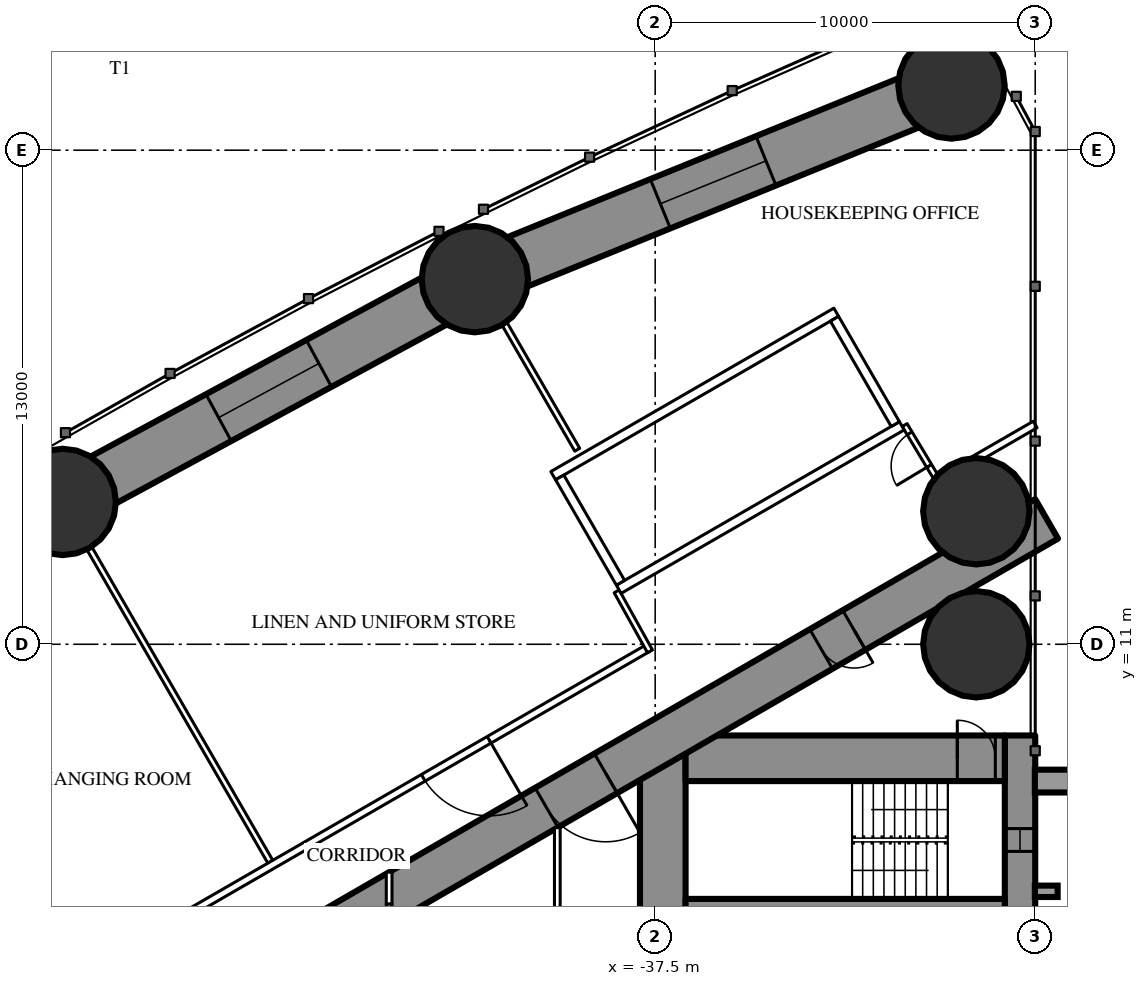
"""IFC4 building model, lengths in metres.
Left out: names, types, materials, properties, quantities, classifications, styles, units other than length and angle.
Written with IfcOpenShell. Run it as: python <this file> out.ifc"""

import sys

from ifc_helpers import new_model, si_unit, direction, frame, frame_2d, origin, origin_2d, place, context, subcontext, project, spatial, rectangle, hollow_circle, extrude, element, fill, save


model = new_model("IFC4")
c1 = context("Model", 3, precision=1e-05, world=origin(), true_north=direction((0.0, 1.0)))
c2 = subcontext(c1, "Body", "Model", "MODEL_VIEW")
j1 = project(units=[si_unit("LENGTHUNIT", "METRE"), si_unit("PLANEANGLEUNIT", "RADIAN")], contexts=[c1])
p1 = place(None, origin())
s1 = spatial("IfcSite", under=j1, at=p1, CompositionType="ELEMENT")
p2 = place(p1, origin())
s2 = spatial("IfcBuilding", under=s1, at=p2, CompositionType="ELEMENT")
p3 = place(p2, frame((0.0, 0.0, 77.5)))
s3 = spatial("IfcBuildingStorey", under=s2, at=p3, CompositionType="ELEMENT", Elevation=77.5)
for number, where, z_axis, x_axis in (
    (1, (-29.703, 25.703, 0.0), (0.0, 0.0, 1.0), (1.0, 0.0, 0.0)),
    (2, (-29.05, 11.0, 0.0), (0.0, 0.0, 1.0), (1.0, 0.0, 0.0)),
    (3, (-29.05, 14.5, 0.0), (0.0, 0.0, 1.0), (1.0, 0.0, 0.0)),
    (4, (-42.245, 20.607, 0.0), (0.0, 0.0, 1.0), (1.0, 0.0, 0.0)),
    (5, (-53.09, 14.745, 0.0), (0.0, 0.0, 1.0), (1.0, 0.0, 0.0)),
):
    element("IfcColumn", number, at=place(p3, frame(where, z_axis=z_axis, x_axis=x_axis)), inside=s3, PredefinedType="COLUMN", context=c2, shape_type="SweptSolid", body=[
        extrude(hollow_circle(Radius=1.4, WallThickness=0.12, at=origin_2d()), origin(), (0.0, 0.0, 1.0), 3.5),
    ])
p4 = place(p3, frame((-27.9, 8.6, 0.0), z_axis=(0.0, 0.0, 1.0), x_axis=(0.0, -1.0, 0.0)))
e6 = element("IfcWall", 6, at=p4, inside=s3, PredefinedType="SHEAR", context=c2, shape_type="SweptSolid", body=[
    extrude(rectangle(XDim=17.2, YDim=0.8, at=frame_2d((8.6, 0.0))), origin(), (0.0, 0.0, 1.0), 3.5),
])
p5 = place(p4, frame((2.45, 0.0, 0.6)))
e7 = element("IfcOpeningElement", 7, at=p5, cuts=e6, PredefinedType="OPENING", context=c2, shape_type="SweptSolid", body=[
    extrude(rectangle(XDim=0.6, YDim=2.1, at=frame_2d((0.3, 1.05))), frame((0.0, 0.41, 0.0), z_axis=(0.0, -1.0, 0.0), x_axis=(1.0, 0.0, 0.0)), (0.0, 0.0, 1.0), 0.82),
])
p6 = place(p4, frame((14.15, 0.0, 0.6)))
e8 = element("IfcOpeningElement", 8, at=p6, cuts=e6, PredefinedType="OPENING", context=c2, shape_type="SweptSolid", body=[
    extrude(rectangle(XDim=0.6, YDim=2.1, at=frame_2d((0.3, 1.05))), frame((0.0, 0.41, 0.0), z_axis=(0.0, -1.0, 0.0), x_axis=(1.0, 0.0, 0.0)), (0.0, 0.0, 1.0), 0.82),
])
p7 = place(p3, frame((-37.3, 8.6, 0.0), z_axis=(0.0, 0.0, 1.0), x_axis=(0.0, -1.0, 0.0)))
e9 = element("IfcWall", 9, at=p7, inside=s3, PredefinedType="SHEAR", context=c2, shape_type="SweptSolid", body=[
    extrude(rectangle(XDim=17.2, YDim=1.2, at=frame_2d((8.6, 0.0))), origin(), (0.0, 0.0, 1.0), 3.5),
])
p8 = place(p7, frame((7.7, 0.0, 0.0)))
e10 = element("IfcOpeningElement", 10, at=p8, cuts=e9, PredefinedType="OPENING", context=c2, shape_type="SweptSolid", body=[
    extrude(rectangle(XDim=1.8, YDim=2.2, at=frame_2d((0.9, 1.1))), frame((0.0, 0.61, 0.0), z_axis=(0.0, -1.0, 0.0), x_axis=(1.0, 0.0, 0.0)), (0.0, 0.0, 1.0), 1.22),
])
p9 = place(p3, frame((-28.3, 8.0, 0.0), z_axis=(0.0, 0.0, 1.0), x_axis=(-1.0, 0.0, 0.0)))
e11 = element("IfcWall", 11, at=p9, inside=s3, PredefinedType="SHEAR", context=c2, shape_type="SweptSolid", body=[
    extrude(rectangle(XDim=8.4, YDim=1.2, at=frame_2d((4.2, 0.0))), origin(), (0.0, 0.0, 1.0), 3.5),
])
p10 = place(p9, frame((0.25, 0.0, 0.0)))
e12 = element("IfcOpeningElement", 12, at=p10, cuts=e11, PredefinedType="OPENING", context=c2, shape_type="SweptSolid", body=[
    extrude(rectangle(XDim=1.0, YDim=2.2, at=frame_2d((0.5, 1.1))), frame((0.0, 0.61, 0.0), z_axis=(0.0, -1.0, 0.0), x_axis=(1.0, 0.0, 0.0)), (0.0, 0.0, 1.0), 1.22),
])
p11 = place(p3, frame((-28.3, 4.15, 0.0), z_axis=(0.0, 0.0, 1.0), x_axis=(-1.0, 0.0, 0.0)))
e13 = element("IfcWall", 13, at=p11, inside=s3, PredefinedType="SHEAR", context=c2, shape_type="SweptSolid", body=[
    extrude(rectangle(XDim=8.4, YDim=0.3, at=frame_2d((4.2, 0.0))), origin(), (0.0, 0.0, 1.0), 3.5),
])
p12 = place(p3, frame((-27.2, 14.3, 0.0), z_axis=(0.0, 0.0, 1.0), x_axis=(-0.866026593062, -0.499997940104, 0.0)))
e14 = element("IfcWall", 14, at=p12, inside=s3, PredefinedType="SHEAR", context=c2, shape_type="SweptSolid", body=[
    extrude(rectangle(XDim=28.946, YDim=1.2, at=frame_2d((14.473, 0.0))), origin(), (0.0, 0.0, 1.0), 3.5),
])
p13 = place(p12, frame((5.85, 0.0, 0.0)))
e15 = element("IfcOpeningElement", 15, at=p13, cuts=e14, PredefinedType="OPENING", context=c2, shape_type="SweptSolid", body=[
    extrude(rectangle(XDim=1.0, YDim=2.2, at=frame_2d((0.5, 1.1))), frame((0.0, 0.61, 0.0), z_axis=(0.0, -1.0, 0.0), x_axis=(1.0, 0.0, 0.0)), (0.0, 0.0, 1.0), 1.22),
])
p14 = place(p12, frame((13.395, 0.0, 0.0)))
e16 = element("IfcOpeningElement", 16, at=p14, cuts=e14, PredefinedType="OPENING", context=c2, shape_type="SweptSolid", body=[
    extrude(rectangle(XDim=1.8, YDim=2.04, at=frame_2d((0.9, 1.02))), frame((0.0, 0.61, 0.0), z_axis=(0.0, -1.0, 0.0), x_axis=(1.0, 0.0, 0.0)), (0.0, 0.0, 1.0), 1.22),
])
p15 = place(p3, frame((-29.703, 25.703, 0.0), z_axis=(0.0, 0.0, 1.0), x_axis=(-0.926463236197, -0.376385270667, 0.0)))
e17 = element("IfcWall", 17, at=p15, inside=s3, PredefinedType="SHEAR", context=c2, shape_type="SweptSolid", body=[
    extrude(rectangle(XDim=13.537, YDim=1.4, at=frame_2d((6.769, 0.0))), origin(), (0.0, 0.0, 1.0), 3.5),
])
p16 = place(p15, frame((5.269, 0.0, 0.6)))
e18 = element("IfcOpeningElement", 18, at=p16, cuts=e17, PredefinedType="OPENING", context=c2, shape_type="SweptSolid", body=[
    extrude(rectangle(XDim=3.0, YDim=1.2, at=frame_2d((1.5, 0.6))), frame((0.0, 0.71, 0.0), z_axis=(0.0, -1.0, 0.0), x_axis=(1.0, 0.0, 0.0)), (0.0, 0.0, 1.0), 1.42),
])
p17 = place(p3, frame((-42.245, 20.607, 0.0), z_axis=(0.0, 0.0, 1.0), x_axis=(-0.879692855603, -0.475542300749, 0.0)))
e19 = element("IfcWall", 19, at=p17, inside=s3, PredefinedType="SHEAR", context=c2, shape_type="SweptSolid", body=[
    extrude(rectangle(XDim=12.328, YDim=1.4, at=frame_2d((6.164, 0.0))), origin(), (0.0, 0.0, 1.0), 3.5),
])
p18 = place(p17, frame((4.664, 0.0, 0.6)))
e20 = element("IfcOpeningElement", 20, at=p18, cuts=e19, PredefinedType="OPENING", context=c2, shape_type="SweptSolid", body=[
    extrude(rectangle(XDim=3.0, YDim=1.2, at=frame_2d((1.5, 0.6))), frame((0.0, 0.71, 0.0), z_axis=(0.0, -1.0, 0.0), x_axis=(1.0, 0.0, 0.0)), (0.0, 0.0, 1.0), 1.42),
])
p19 = place(p3, frame((-53.09, 14.745, 0.0), z_axis=(0.0, 0.0, 1.0), x_axis=(-0.850225894333, -0.526418016984, 0.0)))
e21 = element("IfcWall", 21, at=p19, inside=s3, PredefinedType="SHEAR", context=c2, shape_type="SweptSolid", body=[
    extrude(rectangle(XDim=12.328, YDim=1.4, at=frame_2d((6.164, 0.0))), origin(), (0.0, 0.0, 1.0), 3.5),
])
p20 = place(p19, frame((4.664, 0.0, 0.6)))
e22 = element("IfcOpeningElement", 22, at=p20, cuts=e21, PredefinedType="OPENING", context=c2, shape_type="SweptSolid", body=[
    extrude(rectangle(XDim=3.0, YDim=1.2, at=frame_2d((1.5, 0.6))), frame((0.0, 0.71, 0.0), z_axis=(0.0, -1.0, 0.0), x_axis=(1.0, 0.0, 0.0)), (0.0, 0.0, 1.0), 1.42),
])
p21 = place(p3, frame((-47.627, 5.278, 0.0), z_axis=(0.0, 0.0, 1.0), x_axis=(-0.500009844318, 0.86601972009, 0.0)))
e23 = element("IfcWall", 23, at=p21, inside=s3, PredefinedType="PARTITIONING", context=c2, shape_type="SweptSolid", body=[
    extrude(rectangle(XDim=9.51, YDim=0.15, at=frame_2d((4.755, 0.0))), origin(), (0.0, 0.0, 1.0), 2.05),
])
p22 = place(p3, frame((-39.551, 16.119, 0.0), z_axis=(0.0, 0.0, 1.0), x_axis=(-0.500014214979, 0.866017196607, 0.0)))
e24 = element("IfcWall", 24, at=p22, inside=s3, PredefinedType="PARTITIONING", context=c2, shape_type="SweptSolid", body=[
    extrude(rectangle(XDim=3.815, YDim=0.15, at=frame_2d((1.907, 0.0))), origin(), (0.0, 0.0, 1.0), 3.25),
])
p23 = place(p3, frame((-27.5, 16.782, 0.0), z_axis=(0.0, 0.0, 1.0), x_axis=(-0.866045812642, -0.499964649156, 0.0)))
e25 = element("IfcWall", 25, at=p23, inside=s3, PredefinedType="PARTITIONING", context=c2, shape_type="SweptSolid", body=[
    extrude(rectangle(XDim=2.938, YDim=0.2, at=frame_2d((1.469, 0.0))), origin(), (0.0, 0.0, 1.0), 3.25),
])
p24 = place(p3, frame((-37.7, 10.894, 0.0), z_axis=(0.0, 0.0, 1.0), x_axis=(-0.866027905338, -0.499995667157, 0.0)))
e26 = element("IfcWall", 26, at=p24, inside=s3, PredefinedType="PARTITIONING", context=c2, shape_type="SweptSolid", body=[
    extrude(rectangle(XDim=21.787, YDim=0.2, at=frame_2d((10.894, 0.0))), origin(), (0.0, 0.0, 1.0), 3.25),
])
p25 = place(p24, frame((14.644, 0.0, 0.0)))
e27 = element("IfcOpeningElement", 27, at=p25, cuts=e26, PredefinedType="OPENING", context=c2, shape_type="SweptSolid", body=[
    extrude(rectangle(XDim=1.8, YDim=2.2, at=frame_2d((0.9, 1.1))), frame((0.0, 0.11, 0.0), z_axis=(0.0, -1.0, 0.0), x_axis=(1.0, 0.0, 0.0)), (0.0, 0.0, 1.0), 0.22),
])
p26 = place(p24, frame((19.958, 0.0, 0.0)))
e28 = element("IfcOpeningElement", 28, at=p26, cuts=e26, PredefinedType="OPENING", context=c2, shape_type="SweptSolid", body=[
    extrude(rectangle(XDim=1.329, YDim=2.04, at=frame_2d((0.665, 1.02))), frame((0.0, 0.11, 0.0), z_axis=(0.0, -1.0, 0.0), x_axis=(1.0, 0.0, 0.0)), (0.0, 0.0, 1.0), 0.22),
])
p27 = place(p24, frame((4.815, 0.0, 0.0)))
e29 = element("IfcOpeningElement", 29, at=p27, cuts=e26, PredefinedType="OPENING", context=c2, shape_type="SweptSolid", body=[
    extrude(rectangle(XDim=2.0, YDim=2.4, at=frame_2d((1.0, 1.2))), frame((0.0, 0.11, 0.0), z_axis=(0.0, -1.0, 0.0), x_axis=(1.0, 0.0, 0.0)), (0.0, 0.0, 1.0), 0.22),
])
p28 = place(p3, frame((-30.007, 15.219, 0.0), z_axis=(0.0, 0.0, 1.0), x_axis=(-0.514296815006, 0.857612258585, 0.0)))
e30 = element("IfcWall", 30, at=p28, inside=s3, PredefinedType="PARTITIONING", context=c2, shape_type="SweptSolid", body=[
    extrude(rectangle(XDim=1.805, YDim=0.15, at=frame_2d((0.902, 0.0))), origin(), (0.0, 0.0, 1.0), 3.25),
])
p29 = place(p28, frame((0.552, 0.0, 0.0)))
e31 = element("IfcOpeningElement", 31, at=p29, cuts=e30, PredefinedType="OPENING", context=c2, shape_type="SweptSolid", body=[
    extrude(rectangle(XDim=1.0, YDim=2.04, at=frame_2d((0.5, 1.02))), frame((0.0, 0.085, 0.0), z_axis=(0.0, -1.0, 0.0), x_axis=(1.0, 0.0, 0.0)), (0.0, 0.0, 1.0), 0.17),
])
p30 = place(p3, frame((-38.513, 12.392, 0.0), z_axis=(0.0, 0.0, 1.0), x_axis=(0.485585508183, -0.874189175317, 0.0)))
e32 = element("IfcWall", 32, at=p30, inside=s3, PredefinedType="PARTITIONING", context=c2, shape_type="SweptSolid", body=[
    extrude(rectangle(XDim=1.805, YDim=0.15, at=frame_2d((0.902, 0.0))), origin(), (0.0, 0.0, 1.0), 3.25),
])
p31 = place(p3, frame((-40.075, 6.174, 0.0), z_axis=(0.0, 0.0, 1.0), x_axis=(0.0, -1.0, 0.0)))
e33 = element("IfcWall", 33, at=p31, inside=s3, PredefinedType="PARTITIONING", context=c2, shape_type="SweptSolid", body=[
    extrude(rectangle(XDim=7.374, YDim=0.15, at=frame_2d((3.687, 0.0))), origin(), (0.0, 0.0, 1.0), 3.25),
])
p32 = place(p31, frame((2.787, 0.0, 0.0)))
e34 = element("IfcOpeningElement", 34, at=p32, cuts=e33, PredefinedType="OPENING", context=c2, shape_type="SweptSolid", body=[
    extrude(rectangle(XDim=1.8, YDim=2.2, at=frame_2d((0.9, 1.1))), frame((0.0, 0.085, 0.0), z_axis=(0.0, -1.0, 0.0), x_axis=(1.0, 0.0, 0.0)), (0.0, 0.0, 1.0), 0.17),
])
p33 = place(p3, frame((-44.5, 4.169, 0.0), z_axis=(0.0, 0.0, 1.0), x_axis=(0.0, -1.0, 0.0)))
e35 = element("IfcWall", 35, at=p33, inside=s3, PredefinedType="PARTITIONING", context=c2, shape_type="SweptSolid", body=[
    extrude(rectangle(XDim=9.173, YDim=0.15, at=frame_2d((4.587, 0.0))), origin(), (0.0, 0.0, 1.0), 3.25),
])
p34 = place(p33, frame((1.167, 0.0, 0.0)))
e36 = element("IfcOpeningElement", 36, at=p34, cuts=e35, PredefinedType="OPENING", context=c2, shape_type="SweptSolid", body=[
    extrude(rectangle(XDim=1.0, YDim=2.2, at=frame_2d((0.5, 1.1))), frame((0.0, 0.085, 0.0), z_axis=(0.0, -1.0, 0.0), x_axis=(1.0, 0.0, 0.0)), (0.0, 0.0, 1.0), 0.17),
])
p35 = place(p33, frame((6.171, 0.0, 0.0)))
e37 = element("IfcOpeningElement", 37, at=p35, cuts=e35, PredefinedType="OPENING", context=c2, shape_type="SweptSolid", body=[
    extrude(rectangle(XDim=1.0, YDim=2.2, at=frame_2d((0.5, 1.1))), frame((0.0, 0.085, 0.0), z_axis=(0.0, -1.0, 0.0), x_axis=(1.0, 0.0, 0.0)), (0.0, 0.0, 1.0), 0.17),
])
for number, where, z_axis, x_axis in (
    (38, (-31.01, 16.747, 0.0), (0.0, 0.0, 1.0), (-0.866, -0.5, 0.0)),
    (39, (-32.736, 19.736, 0.0), (0.0, 0.0, 1.0), (-0.866, -0.5, 0.0)),
):
    element("IfcWall", number, at=place(p3, frame(where, z_axis=z_axis, x_axis=x_axis)), inside=s3, PredefinedType="PARTITIONING", context=c2, shape_type="SweptSolid", body=[
        extrude(rectangle(XDim=8.6, YDim=0.25, at=frame_2d((4.3, 0.0))), origin(), (0.0, 0.0, 1.0), 3.25),
    ])
p36 = place(p3, frame((-31.181, 16.793, 0.0), z_axis=(0.0, 0.0, 1.0), x_axis=(-0.499929347863, 0.866066190972, 0.0)))
e40 = element("IfcWall", 40, at=p36, inside=s3, PredefinedType="PARTITIONING", context=c2, shape_type="SweptSolid", body=[
    extrude(rectangle(XDim=3.201, YDim=0.25, at=frame_2d((1.6, 0.0))), origin(), (0.0, 0.0, 1.0), 3.25),
])
p37 = place(p3, frame((-38.413, 12.618, 0.0), z_axis=(0.0, 0.0, 1.0), x_axis=(-0.499872130319, 0.866099216793, 0.0)))
e41 = element("IfcWall", 41, at=p37, inside=s3, PredefinedType="PARTITIONING", context=c2, shape_type="SweptSolid", body=[
    extrude(rectangle(XDim=3.2, YDim=0.25, at=frame_2d((1.6, 0.0))), origin(), (0.0, 0.0, 1.0), 3.25),
])
p38 = place(p3, frame((-44.5, 5.005, 0.0), z_axis=(0.0, 0.0, 1.0), x_axis=(0.0, -1.0, 0.0)))
e42 = element("IfcWall", 42, at=p38, inside=s3, PredefinedType="PARTITIONING", context=c2, shape_type="SweptSolid", body=[
    extrude(rectangle(XDim=0.836, YDim=0.15, at=frame_2d((0.418, 0.0))), origin(), (0.0, 0.0, 1.0), 2.05),
])
p39 = place(p16, origin())
e43 = element("IfcWindow", 43, at=p39, inside=s3, PartitioningType="SINGLE_PANEL", PredefinedType="WINDOW", context=c2, shape_type="SweptSolid", body=[
    extrude(rectangle(XDim=3.0, YDim=1.2, at=frame_2d((1.5, 0.6))), frame((0.0, 0.03, 0.0), z_axis=(0.0, -1.0, 0.0), x_axis=(1.0, 0.0, 0.0)), (0.0, 0.0, 1.0), 0.06),
])
fill(e18, e43)
p40 = place(p18, origin())
e44 = element("IfcWindow", 44, at=p40, inside=s3, PartitioningType="SINGLE_PANEL", PredefinedType="WINDOW", context=c2, shape_type="SweptSolid", body=[
    extrude(rectangle(XDim=3.0, YDim=1.2, at=frame_2d((1.5, 0.6))), frame((0.0, 0.03, 0.0), z_axis=(0.0, -1.0, 0.0), x_axis=(1.0, 0.0, 0.0)), (0.0, 0.0, 1.0), 0.06),
])
fill(e20, e44)
p41 = place(p29, origin())
e45 = element("IfcDoor", 45, at=p41, inside=s3, OperationType="SINGLE_SWING_LEFT", PredefinedType="DOOR", context=c2, shape_type="SweptSolid", body=[
    extrude(rectangle(XDim=1.0, YDim=2.04, at=frame_2d((0.5, 1.02))), frame((0.0, 0.025, 0.0), z_axis=(0.0, -1.0, 0.0), x_axis=(1.0, 0.0, 0.0)), (0.0, 0.0, 1.0), 0.05),
])
fill(e31, e45)
p42 = place(p27, origin())
e46 = element("IfcDoor", 46, at=p42, inside=s3, OperationType="DOUBLE_DOOR_SINGLE_SWING", PredefinedType="DOOR", context=c2, shape_type="SweptSolid", body=[
    extrude(rectangle(XDim=2.0, YDim=2.4, at=frame_2d((1.0, 1.2))), frame((0.0, 0.025, 0.0), z_axis=(0.0, -1.0, 0.0), x_axis=(1.0, 0.0, 0.0)), (0.0, 0.0, 1.0), 0.05),
])
fill(e29, e46)
p43 = place(p13, origin())
e47 = element("IfcDoor", 47, at=p43, inside=s3, OperationType="SINGLE_SWING_LEFT", PredefinedType="DOOR", context=c2, shape_type="SweptSolid", body=[
    extrude(rectangle(XDim=1.0, YDim=2.2, at=frame_2d((0.5, 1.1))), frame((0.0, 0.025, 0.0), z_axis=(0.0, -1.0, 0.0), x_axis=(1.0, 0.0, 0.0)), (0.0, 0.0, 1.0), 0.05),
])
fill(e15, e47)
p44 = place(p14, origin())
e48 = element("IfcDoor", 48, at=p44, inside=s3, OperationType="DOUBLE_DOOR_SINGLE_SWING", PredefinedType="DOOR", context=c2, shape_type="SweptSolid", body=[
    extrude(rectangle(XDim=1.8, YDim=2.04, at=frame_2d((0.9, 1.02))), frame((0.0, 0.025, 0.0), z_axis=(0.0, -1.0, 0.0), x_axis=(1.0, 0.0, 0.0)), (0.0, 0.0, 1.0), 0.05),
])
fill(e16, e48)
p45 = place(p10, origin())
e49 = element("IfcDoor", 49, at=p45, inside=s3, OperationType="SINGLE_SWING_RIGHT", PredefinedType="DOOR", context=c2, shape_type="SweptSolid", body=[
    extrude(rectangle(XDim=1.0, YDim=2.2, at=frame_2d((0.5, 1.1))), frame((0.0, 0.025, 0.0), z_axis=(0.0, -1.0, 0.0), x_axis=(1.0, 0.0, 0.0)), (0.0, 0.0, 1.0), 0.05),
])
fill(e12, e49)
p46 = place(p5, origin())
e50 = element("IfcWindow", 50, at=p46, inside=s3, PartitioningType="SINGLE_PANEL", PredefinedType="WINDOW", context=c2, shape_type="SweptSolid", body=[
    extrude(rectangle(XDim=0.6, YDim=2.1, at=frame_2d((0.3, 1.05))), frame((0.0, 0.03, 0.0), z_axis=(0.0, -1.0, 0.0), x_axis=(1.0, 0.0, 0.0)), (0.0, 0.0, 1.0), 0.06),
])
fill(e7, e50)
save(model, sys.argv[1])
